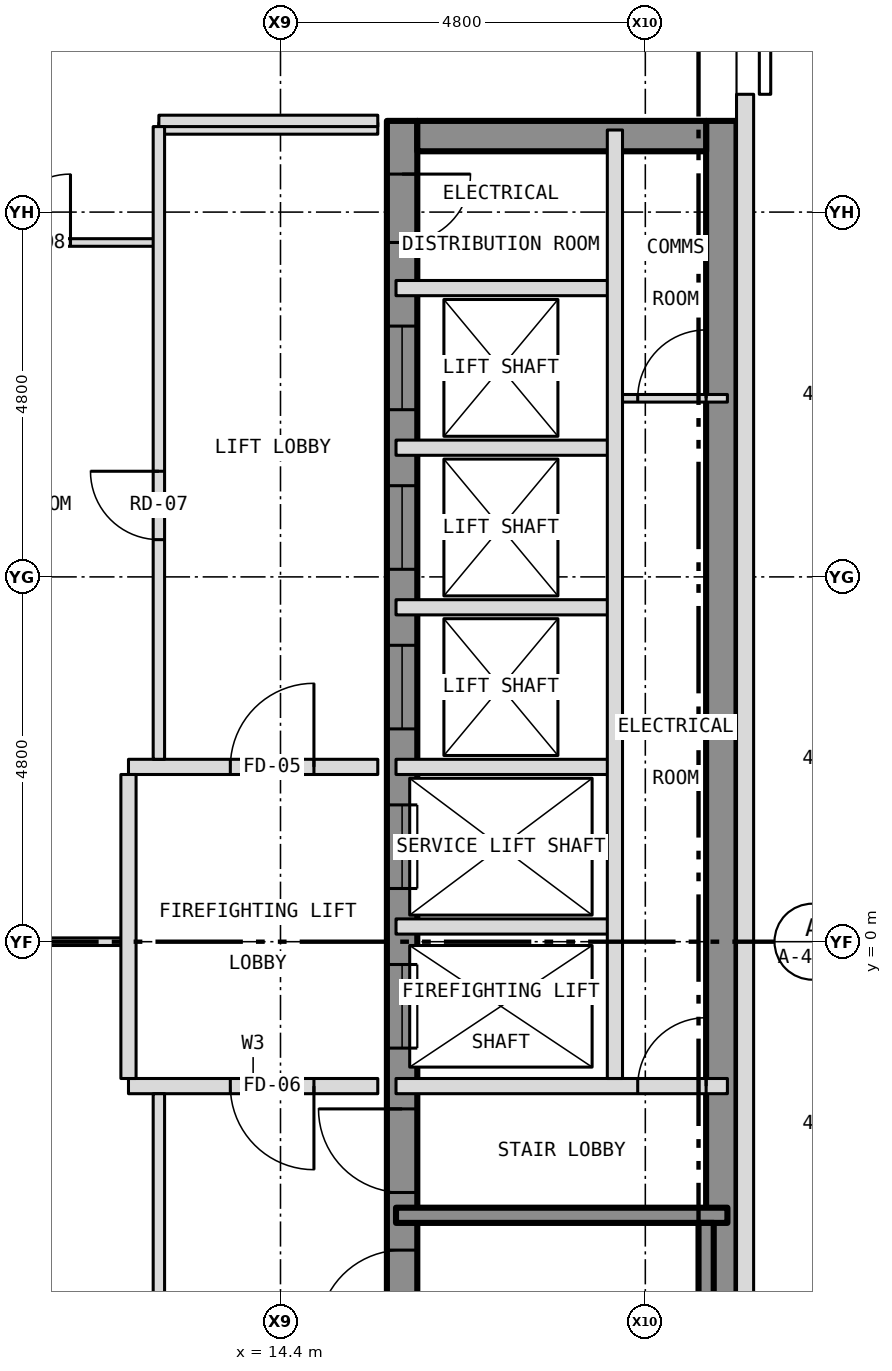
"""IFC4 building model, lengths in metres.
Left out: names, types, materials, properties, quantities, classifications, styles, units other than length and angle.
Written with IfcOpenShell. Run it as: python <this file> out.ifc"""

import sys

from ifc_helpers import new_model, si_unit, direction, frame, frame_2d, origin, place, context, subcontext, project, spatial, rectangle, extrude, element, fill, save


model = new_model("IFC4")
c1 = context("Model", 3, precision=1e-05, world=origin(), true_north=direction((0.0, 1.0)))
c2 = subcontext(c1, "Body", "Model", "MODEL_VIEW")
j1 = project(units=[si_unit("LENGTHUNIT", "METRE"), si_unit("PLANEANGLEUNIT", "RADIAN")], contexts=[c1])
p1 = place(None, origin())
s1 = spatial("IfcSite", under=j1, at=p1, CompositionType="ELEMENT")
p2 = place(p1, origin())
s2 = spatial("IfcBuilding", under=s1, at=p2, CompositionType="ELEMENT")
p3 = place(p2, frame((0.0, 0.0, 265.5)))
s3 = spatial("IfcBuildingStorey", under=s2, at=p3, CompositionType="ELEMENT", Elevation=265.5)
p4 = place(p3, frame((16.0, -10.8, 0.0), z_axis=(0.0, 0.0, 1.0), x_axis=(0.0, 1.0, 0.0)))
e1 = element("IfcWall", 1, at=p4, inside=s3, PredefinedType="SHEAR", context=c2, shape_type="SweptSolid", body=[
    extrude(rectangle(XDim=21.6, YDim=0.4, at=frame_2d((10.8, 0.0))), origin(), (0.0, 0.0, 1.0), 3.25),
])
p5 = place(p4, frame((9.4, 0.0, 0.0)))
e2 = element("IfcOpeningElement", 2, at=p5, cuts=e1, PredefinedType="OPENING", context=c2, shape_type="SweptSolid", body=[
    extrude(rectangle(XDim=1.1, YDim=2.1, at=frame_2d((0.55, 1.05))), frame((0.0, 0.212, 0.0), z_axis=(0.0, -1.0, 0.0), x_axis=(1.0, 0.0, 0.0)), (0.0, 0.0, 1.0), 0.424),
])
p6 = place(p4, frame((11.5, 0.0, 0.0)))
e3 = element("IfcOpeningElement", 3, at=p6, cuts=e1, PredefinedType="OPENING", context=c2, shape_type="SweptSolid", body=[
    extrude(rectangle(XDim=1.1, YDim=2.1, at=frame_2d((0.55, 1.05))), frame((0.0, 0.212, 0.0), z_axis=(0.0, -1.0, 0.0), x_axis=(1.0, 0.0, 0.0)), (0.0, 0.0, 1.0), 0.424),
])
p7 = place(p4, frame((13.6, 0.0, 0.0)))
e4 = element("IfcOpeningElement", 4, at=p7, cuts=e1, PredefinedType="OPENING", context=c2, shape_type="SweptSolid", body=[
    extrude(rectangle(XDim=1.1, YDim=2.1, at=frame_2d((0.55, 1.05))), frame((0.0, 0.212, 0.0), z_axis=(0.0, -1.0, 0.0), x_axis=(1.0, 0.0, 0.0)), (0.0, 0.0, 1.0), 0.424),
])
p8 = place(p4, frame((15.7, 0.0, 0.0)))
e5 = element("IfcOpeningElement", 5, at=p8, cuts=e1, PredefinedType="OPENING", context=c2, shape_type="SweptSolid", body=[
    extrude(rectangle(XDim=1.1, YDim=2.1, at=frame_2d((0.55, 1.05))), frame((0.0, 0.212, 0.0), z_axis=(0.0, -1.0, 0.0), x_axis=(1.0, 0.0, 0.0)), (0.0, 0.0, 1.0), 0.424),
])
p9 = place(p4, frame((17.8, 0.0, 0.0)))
e6 = element("IfcOpeningElement", 6, at=p9, cuts=e1, PredefinedType="OPENING", context=c2, shape_type="SweptSolid", body=[
    extrude(rectangle(XDim=1.1, YDim=2.1, at=frame_2d((0.55, 1.05))), frame((0.0, 0.212, 0.0), z_axis=(0.0, -1.0, 0.0), x_axis=(1.0, 0.0, 0.0)), (0.0, 0.0, 1.0), 0.424),
])
p10 = place(p4, frame((5.642, 0.0, 0.0)))
e7 = element("IfcOpeningElement", 7, at=p10, cuts=e1, PredefinedType="OPENING", context=c2, shape_type="SweptSolid", body=[
    extrude(rectangle(XDim=1.1, YDim=2.1, at=frame_2d((0.55, 1.05))), frame((0.0, 0.212, 0.0), z_axis=(0.0, -1.0, 0.0), x_axis=(1.0, 0.0, 0.0)), (0.0, 0.0, 1.0), 0.424),
])
p11 = place(p4, frame((7.5, 0.0, 0.0)))
e8 = element("IfcOpeningElement", 8, at=p11, cuts=e1, PredefinedType="OPENING", context=c2, shape_type="SweptSolid", body=[
    extrude(rectangle(XDim=1.1, YDim=2.1, at=frame_2d((0.55, 1.05))), frame((0.0, 0.212, 0.0), z_axis=(0.0, -1.0, 0.0), x_axis=(1.0, 0.0, 0.0)), (0.0, 0.0, 1.0), 0.424),
])
p12 = place(p4, frame((20.0, 0.0, 0.0)))
e9 = element("IfcOpeningElement", 9, at=p12, cuts=e1, PredefinedType="OPENING", context=c2, shape_type="SweptSolid", body=[
    extrude(rectangle(XDim=0.9, YDim=2.1, at=frame_2d((0.45, 1.05))), frame((0.0, 0.212, 0.0), z_axis=(0.0, -1.0, 0.0), x_axis=(1.0, 0.0, 0.0)), (0.0, 0.0, 1.0), 0.424),
])
p13 = place(p3, frame((20.2, -10.8, 0.0), z_axis=(0.0, 0.0, 1.0), x_axis=(0.0, 1.0, 0.0)))
e10 = element("IfcWall", 10, at=p13, inside=s3, PredefinedType="SHEAR", context=c2, shape_type="SweptSolid", body=[
    extrude(rectangle(XDim=21.6, YDim=0.4, at=frame_2d((10.8, 0.0))), origin(), (0.0, 0.0, 1.0), 3.25),
])
p14 = place(p3, frame((16.2, 10.6, 0.0), z_axis=(0.0, 0.0, 1.0), x_axis=(1.0, 0.0, 0.0)))
e11 = element("IfcWall", 11, at=p14, inside=s3, PredefinedType="SHEAR", context=c2, shape_type="SweptSolid", body=[
    extrude(rectangle(XDim=3.8, YDim=0.4, at=frame_2d((1.9, 0.0))), origin(), (0.0, 0.0, 1.0), 3.25),
])
p15 = place(p3, frame((20.512, -11.15, 0.0), z_axis=(0.0, 0.0, 1.0), x_axis=(0.0, 1.0, 0.0)))
e12 = element("IfcWall", 12, at=p15, inside=s3, PredefinedType="SOLIDWALL", context=c2, shape_type="SweptSolid", body=[
    extrude(rectangle(XDim=22.3, YDim=0.225, at=frame_2d((11.15, 0.0))), origin(), (0.0, 0.0, 1.0), 3.5),
])
p16 = place(p15, frame((3.3, 0.0, 1.0)))
e13 = element("IfcOpeningElement", 13, at=p16, cuts=e12, PredefinedType="OPENING", context=c2, shape_type="SweptSolid", body=[
    extrude(rectangle(XDim=0.6, YDim=1.5, at=frame_2d((0.3, 0.75))), frame((0.0, 0.125, 0.0), z_axis=(0.0, -1.0, 0.0), x_axis=(1.0, 0.0, 0.0)), (0.0, 0.0, 1.0), 0.249),
])
p17 = place(p3, frame((15.92, -3.6, 0.0), z_axis=(0.0, 0.0, 1.0), x_axis=(1.0, 0.0, 0.0)))
e14 = element("IfcWall", 14, at=p17, inside=s3, PredefinedType="SHEAR", context=c2, shape_type="SweptSolid", body=[
    extrude(rectangle(XDim=4.36, YDim=0.2, at=frame_2d((2.18, 0.0))), origin(), (0.0, 0.0, 1.0), 3.25),
])
p18 = place(p3, frame((12.4, -1.9, 0.0), z_axis=(0.0, 0.0, 1.0), x_axis=(1.0, 0.0, 0.0)))
e15 = element("IfcWall", 15, at=p18, inside=s3, PredefinedType="PARTITIONING", context=c2, shape_type="SweptSolid", body=[
    extrude(rectangle(XDim=3.28, YDim=0.2, at=frame_2d((1.64, 0.0))), origin(), (0.0, 0.0, 1.0), 3.35),
])
p19 = place(p18, frame((1.34, 0.0, 0.0)))
e16 = element("IfcOpeningElement", 16, at=p19, cuts=e15, PredefinedType="OPENING", context=c2, shape_type="SweptSolid", body=[
    extrude(rectangle(XDim=1.1, YDim=2.1, at=frame_2d((0.55, 1.05))), frame((0.0, 0.112, 0.0), z_axis=(0.0, -1.0, 0.0), x_axis=(1.0, 0.0, 0.0)), (0.0, 0.0, 1.0), 0.224),
])
p20 = place(p3, frame((15.92, -1.9, 0.0), z_axis=(0.0, 0.0, 1.0), x_axis=(1.0, 0.0, 0.0)))
e17 = element("IfcWall", 17, at=p20, inside=s3, PredefinedType="PARTITIONING", context=c2, shape_type="SweptSolid", body=[
    extrude(rectangle(XDim=4.36, YDim=0.2, at=frame_2d((2.18, 0.0))), origin(), (0.0, 0.0, 1.0), 3.25),
])
p21 = place(p20, frame((3.18, 0.0, 0.0)))
e18 = element("IfcOpeningElement", 18, at=p21, cuts=e17, PredefinedType="OPENING", context=c2, shape_type="SweptSolid", body=[
    extrude(rectangle(XDim=0.9, YDim=2.1, at=frame_2d((0.45, 1.05))), frame((0.0, 0.112, 0.0), z_axis=(0.0, -1.0, 0.0), x_axis=(1.0, 0.0, 0.0)), (0.0, 0.0, 1.0), 0.224),
])
p22 = place(p3, frame((9.784, 0.0, 0.0), z_axis=(0.0, 0.0, 1.0), x_axis=(1.0, 0.0, 0.0)))
e19 = element("IfcWall", 19, at=p22, inside=s3, PredefinedType="PARTITIONING", context=c2, shape_type="SweptSolid", body=[
    extrude(rectangle(XDim=2.616, YDim=0.1, at=frame_2d((1.308, 0.0))), origin(), (0.0, 0.0, 1.0), 2.728),
])
p23 = place(p3, frame((15.92, 0.2, 0.0), z_axis=(0.0, 0.0, 1.0), x_axis=(1.0, 0.0, 0.0)))
e20 = element("IfcWall", 20, at=p23, inside=s3, PredefinedType="PARTITIONING", context=c2, shape_type="SweptSolid", body=[
    extrude(rectangle(XDim=2.88, YDim=0.2, at=frame_2d((1.44, 0.0))), origin(), (0.0, 0.0, 1.0), 3.25),
])
p24 = place(p3, frame((12.4, 2.3, 0.0), z_axis=(0.0, 0.0, 1.0), x_axis=(1.0, 0.0, 0.0)))
e21 = element("IfcWall", 21, at=p24, inside=s3, PredefinedType="PARTITIONING", context=c2, shape_type="SweptSolid", body=[
    extrude(rectangle(XDim=3.28, YDim=0.2, at=frame_2d((1.64, 0.0))), origin(), (0.0, 0.0, 1.0), 3.35),
])
p25 = place(p24, frame((1.34, 0.0, 0.0)))
e22 = element("IfcOpeningElement", 22, at=p25, cuts=e21, PredefinedType="OPENING", context=c2, shape_type="SweptSolid", body=[
    extrude(rectangle(XDim=1.1, YDim=2.1, at=frame_2d((0.55, 1.05))), frame((0.0, 0.112, 0.0), z_axis=(0.0, -1.0, 0.0), x_axis=(1.0, 0.0, 0.0)), (0.0, 0.0, 1.0), 0.224),
])
for number, where, z_axis, x_axis in (
    (23, (15.92, 2.3, 0.0), (0.0, 0.0, 1.0), (1.0, 0.0, 0.0)),
    (24, (15.92, 4.4, 0.0), (0.0, 0.0, 1.0), (1.0, 0.0, 0.0)),
    (25, (15.92, 6.5, 0.0), (0.0, 0.0, 1.0), (1.0, 0.0, 0.0)),
):
    element("IfcWall", number, at=place(p3, frame(where, z_axis=z_axis, x_axis=x_axis)), inside=s3, PredefinedType="PARTITIONING", context=c2, shape_type="SweptSolid", body=[
        extrude(rectangle(XDim=2.88, YDim=0.2, at=frame_2d((1.44, 0.0))), origin(), (0.0, 0.0, 1.0), 3.25),
    ])
p26 = place(p3, frame((18.8, 7.15, 0.0), z_axis=(0.0, 0.0, 1.0), x_axis=(1.0, 0.0, 0.0)))
e26 = element("IfcWall", 26, at=p26, inside=s3, PredefinedType="PARTITIONING", context=c2, shape_type="SweptSolid", body=[
    extrude(rectangle(XDim=1.48, YDim=0.1, at=frame_2d((0.74, 0.0))), origin(), (0.0, 0.0, 1.0), 3.25),
])
p27 = place(p26, frame((0.3, 0.0, 0.0)))
e27 = element("IfcOpeningElement", 27, at=p27, cuts=e26, PredefinedType="OPENING", context=c2, shape_type="SweptSolid", body=[
    extrude(rectangle(XDim=0.9, YDim=2.1, at=frame_2d((0.45, 1.05))), frame((0.0, 0.062, 0.0), z_axis=(0.0, -1.0, 0.0), x_axis=(1.0, 0.0, 0.0)), (0.0, 0.0, 1.0), 0.124),
])
p28 = place(p3, frame((15.92, 8.6, 0.0), z_axis=(0.0, 0.0, 1.0), x_axis=(1.0, 0.0, 0.0)))
e28 = element("IfcWall", 28, at=p28, inside=s3, PredefinedType="PARTITIONING", context=c2, shape_type="SweptSolid", body=[
    extrude(rectangle(XDim=2.88, YDim=0.2, at=frame_2d((1.44, 0.0))), origin(), (0.0, 0.0, 1.0), 3.25),
])
p29 = place(p3, frame((6.644, 9.2, 0.0), z_axis=(0.0, 0.0, 1.0), x_axis=(1.0, 0.0, 0.0)))
e29 = element("IfcWall", 29, at=p29, inside=s3, PredefinedType="PARTITIONING", context=c2, shape_type="SweptSolid", body=[
    extrude(rectangle(XDim=6.156, YDim=0.1, at=frame_2d((3.078, 0.0))), origin(), (0.0, 0.0, 1.0), 3.35),
])
p30 = place(p29, frame((4.093, 0.0, 0.0)))
e30 = element("IfcOpeningElement", 30, at=p30, cuts=e29, PredefinedType="OPENING", context=c2, shape_type="SweptSolid", body=[
    extrude(rectangle(XDim=0.9, YDim=2.1, at=frame_2d((0.45, 1.05))), frame((0.0, 0.062, 0.0), z_axis=(0.0, -1.0, 0.0), x_axis=(1.0, 0.0, 0.0)), (0.0, 0.0, 1.0), 0.124),
])
for number, where, z_axis, x_axis in (
    (31, (12.8, 10.7, 0.0), (0.0, 0.0, 1.0), (1.0, 0.0, 0.0)),
    (32, (12.8, 10.8, 0.0), (0.0, 0.0, 1.0), (1.0, 0.0, 0.0)),
):
    element("IfcWall", number, at=place(p3, frame(where, z_axis=z_axis, x_axis=x_axis)), inside=s3, PredefinedType="PARTITIONING", context=c2, shape_type="SweptSolid", body=[
        extrude(rectangle(XDim=2.88, YDim=0.15, at=frame_2d((1.44, 0.0))), origin(), (0.0, 0.0, 1.0), 3.35),
    ])
p31 = place(p3, frame((12.4, -1.8, 0.0), z_axis=(0.0, 0.0, 1.0), x_axis=(0.0, 1.0, 0.0)))
e33 = element("IfcWall", 33, at=p31, inside=s3, PredefinedType="PARTITIONING", context=c2, shape_type="SweptSolid", body=[
    extrude(rectangle(XDim=4.0, YDim=0.2, at=frame_2d((2.0, 0.0))), origin(), (0.0, 0.0, 1.0), 3.35),
])
p32 = place(p3, frame((12.8, -10.725, 0.0), z_axis=(0.0, 0.0, 1.0), x_axis=(0.0, 1.0, 0.0)))
e34 = element("IfcWall", 34, at=p32, inside=s3, PredefinedType="PARTITIONING", context=c2, shape_type="SweptSolid", body=[
    extrude(rectangle(XDim=8.725, YDim=0.15, at=frame_2d((4.363, 0.0))), origin(), (0.0, 0.0, 1.0), 3.35),
])
p33 = place(p32, frame((4.735, 0.0, 0.0)))
e35 = element("IfcOpeningElement", 35, at=p33, cuts=e34, PredefinedType="OPENING", context=c2, shape_type="SweptSolid", body=[
    extrude(rectangle(XDim=0.9, YDim=2.1, at=frame_2d((0.45, 1.05))), frame((0.0, 0.087, 0.0), z_axis=(0.0, -1.0, 0.0), x_axis=(1.0, 0.0, 0.0)), (0.0, 0.0, 1.0), 0.174),
])
p34 = place(p3, frame((12.8, 2.4, 0.0), z_axis=(0.0, 0.0, 1.0), x_axis=(0.0, 1.0, 0.0)))
e36 = element("IfcWall", 36, at=p34, inside=s3, PredefinedType="PARTITIONING", context=c2, shape_type="SweptSolid", body=[
    extrude(rectangle(XDim=8.325, YDim=0.15, at=frame_2d((4.163, 0.0))), origin(), (0.0, 0.0, 1.0), 3.35),
])
p35 = place(p34, frame((2.89, 0.0, 0.0)))
e37 = element("IfcOpeningElement", 37, at=p35, cuts=e36, PredefinedType="OPENING", context=c2, shape_type="SweptSolid", body=[
    extrude(rectangle(XDim=0.9, YDim=2.1, at=frame_2d((0.45, 1.05))), frame((0.0, 0.087, 0.0), z_axis=(0.0, -1.0, 0.0), x_axis=(1.0, 0.0, 0.0)), (0.0, 0.0, 1.0), 0.174),
])
p36 = place(p3, frame((18.8, -1.8, 0.0), z_axis=(0.0, 0.0, 1.0), x_axis=(0.0, 1.0, 0.0)))
e38 = element("IfcWall", 38, at=p36, inside=s3, PredefinedType="PARTITIONING", context=c2, shape_type="SweptSolid", body=[
    extrude(rectangle(XDim=12.48, YDim=0.2, at=frame_2d((6.24, 0.0))), origin(), (0.0, 0.0, 1.0), 3.25),
])
p37 = place(p3, frame((20.0, -10.68, 0.0), z_axis=(0.0, 0.0, 1.0), x_axis=(0.0, 1.0, 0.0)))
e39 = element("IfcWall", 39, at=p37, inside=s3, PredefinedType="SHEAR", context=c2, shape_type="SweptSolid", body=[
    extrude(rectangle(XDim=6.98, YDim=0.2, at=frame_2d((3.49, 0.0))), origin(), (0.0, 0.0, 1.0), 3.25),
])
p38 = place(p5, origin())
e40 = element("IfcDoor", 40, at=p38, inside=s3, OperationType="SLIDING_TO_LEFT", PredefinedType="DOOR", context=c2, shape_type="SweptSolid", body=[
    extrude(rectangle(XDim=1.1, YDim=2.1, at=frame_2d((0.55, 1.05))), frame((0.0, 0.025, 0.0), z_axis=(0.0, -1.0, 0.0), x_axis=(1.0, 0.0, 0.0)), (0.0, 0.0, 1.0), 0.05),
])
fill(e2, e40)
p39 = place(p6, origin())
e41 = element("IfcDoor", 41, at=p39, inside=s3, OperationType="SLIDING_TO_LEFT", PredefinedType="DOOR", context=c2, shape_type="SweptSolid", body=[
    extrude(rectangle(XDim=1.1, YDim=2.1, at=frame_2d((0.55, 1.05))), frame((0.0, 0.025, 0.0), z_axis=(0.0, -1.0, 0.0), x_axis=(1.0, 0.0, 0.0)), (0.0, 0.0, 1.0), 0.05),
])
fill(e3, e41)
p40 = place(p7, origin())
e42 = element("IfcDoor", 42, at=p40, inside=s3, OperationType="SLIDING_TO_LEFT", PredefinedType="DOOR", context=c2, shape_type="SweptSolid", body=[
    extrude(rectangle(XDim=1.1, YDim=2.1, at=frame_2d((0.55, 1.05))), frame((0.0, 0.025, 0.0), z_axis=(0.0, -1.0, 0.0), x_axis=(1.0, 0.0, 0.0)), (0.0, 0.0, 1.0), 0.05),
])
fill(e4, e42)
p41 = place(p8, origin())
e43 = element("IfcDoor", 43, at=p41, inside=s3, OperationType="SLIDING_TO_LEFT", PredefinedType="DOOR", context=c2, shape_type="SweptSolid", body=[
    extrude(rectangle(XDim=1.1, YDim=2.1, at=frame_2d((0.55, 1.05))), frame((0.0, 0.025, 0.0), z_axis=(0.0, -1.0, 0.0), x_axis=(1.0, 0.0, 0.0)), (0.0, 0.0, 1.0), 0.05),
])
fill(e5, e43)
p42 = place(p9, origin())
e44 = element("IfcDoor", 44, at=p42, inside=s3, OperationType="SLIDING_TO_LEFT", PredefinedType="DOOR", context=c2, shape_type="SweptSolid", body=[
    extrude(rectangle(XDim=1.1, YDim=2.1, at=frame_2d((0.55, 1.05))), frame((0.0, 0.025, 0.0), z_axis=(0.0, -1.0, 0.0), x_axis=(1.0, 0.0, 0.0)), (0.0, 0.0, 1.0), 0.05),
])
fill(e6, e44)
p43 = place(p10, origin())
e45 = element("IfcDoor", 45, at=p43, inside=s3, OperationType="SINGLE_SWING_LEFT", PredefinedType="DOOR", context=c2, shape_type="SweptSolid", body=[
    extrude(rectangle(XDim=1.1, YDim=2.1, at=frame_2d((0.55, 1.05))), frame((0.0, 0.025, 0.0), z_axis=(0.0, -1.0, 0.0), x_axis=(1.0, 0.0, 0.0)), (0.0, 0.0, 1.0), 0.05),
])
fill(e7, e45)
p44 = place(p11, origin())
e46 = element("IfcDoor", 46, at=p44, inside=s3, OperationType="SINGLE_SWING_RIGHT", PredefinedType="DOOR", context=c2, shape_type="SweptSolid", body=[
    extrude(rectangle(XDim=1.1, YDim=2.1, at=frame_2d((0.55, 1.05))), frame((0.0, 0.025, 0.0), z_axis=(0.0, -1.0, 0.0), x_axis=(1.0, 0.0, 0.0)), (0.0, 0.0, 1.0), 0.05),
])
fill(e8, e46)
p45 = place(p12, origin())
e47 = element("IfcDoor", 47, at=p45, inside=s3, OperationType="SINGLE_SWING_RIGHT", PredefinedType="DOOR", context=c2, shape_type="SweptSolid", body=[
    extrude(rectangle(XDim=0.9, YDim=2.1, at=frame_2d((0.45, 1.05))), frame((0.0, 0.025, 0.0), z_axis=(0.0, -1.0, 0.0), x_axis=(1.0, 0.0, 0.0)), (0.0, 0.0, 1.0), 0.05),
])
fill(e9, e47)
p46 = place(p21, origin())
e48 = element("IfcDoor", 48, at=p46, inside=s3, OperationType="SINGLE_SWING_RIGHT", PredefinedType="DOOR", context=c2, shape_type="SweptSolid", body=[
    extrude(rectangle(XDim=0.9, YDim=2.1, at=frame_2d((0.45, 1.05))), frame((0.0, 0.025, 0.0), z_axis=(0.0, -1.0, 0.0), x_axis=(1.0, 0.0, 0.0)), (0.0, 0.0, 1.0), 0.05),
])
fill(e18, e48)
p47 = place(p27, origin())
e49 = element("IfcDoor", 49, at=p47, inside=s3, OperationType="SINGLE_SWING_RIGHT", PredefinedType="DOOR", context=c2, shape_type="SweptSolid", body=[
    extrude(rectangle(XDim=0.9, YDim=2.1, at=frame_2d((0.45, 1.05))), frame((0.0, 0.025, 0.0), z_axis=(0.0, -1.0, 0.0), x_axis=(1.0, 0.0, 0.0)), (0.0, 0.0, 1.0), 0.05),
])
fill(e27, e49)
p48 = place(p25, origin())
e50 = element("IfcDoor", 50, at=p48, inside=s3, OperationType="SINGLE_SWING_RIGHT", PredefinedType="DOOR", context=c2, shape_type="SweptSolid", body=[
    extrude(rectangle(XDim=1.1, YDim=2.1, at=frame_2d((0.55, 1.05))), frame((0.0, 0.025, 0.0), z_axis=(0.0, -1.0, 0.0), x_axis=(1.0, 0.0, 0.0)), (0.0, 0.0, 1.0), 0.05),
])
fill(e22, e50)
p49 = place(p19, origin())
e51 = element("IfcDoor", 51, at=p49, inside=s3, OperationType="SINGLE_SWING_RIGHT", PredefinedType="DOOR", context=c2, shape_type="SweptSolid", body=[
    extrude(rectangle(XDim=1.1, YDim=2.1, at=frame_2d((0.55, 1.05))), frame((0.0, 0.025, 0.0), z_axis=(0.0, -1.0, 0.0), x_axis=(1.0, 0.0, 0.0)), (0.0, 0.0, 1.0), 0.05),
])
fill(e16, e51)
p50 = place(p35, origin())
e52 = element("IfcDoor", 52, at=p50, inside=s3, OperationType="SINGLE_SWING_RIGHT", PredefinedType="DOOR", context=c2, shape_type="SweptSolid", body=[
    extrude(rectangle(XDim=0.9, YDim=2.1, at=frame_2d((0.45, 1.05))), frame((0.0, 0.025, 0.0), z_axis=(0.0, -1.0, 0.0), x_axis=(1.0, 0.0, 0.0)), (0.0, 0.0, 1.0), 0.05),
])
fill(e37, e52)
p51 = place(p30, origin())
e53 = element("IfcDoor", 53, at=p51, inside=s3, OperationType="SINGLE_SWING_RIGHT", PredefinedType="DOOR", context=c2, shape_type="SweptSolid", body=[
    extrude(rectangle(XDim=0.9, YDim=2.1, at=frame_2d((0.45, 1.05))), frame((0.0, 0.025, 0.0), z_axis=(0.0, -1.0, 0.0), x_axis=(1.0, 0.0, 0.0)), (0.0, 0.0, 1.0), 0.05),
])
fill(e30, e53)
save(model, sys.argv[1])
